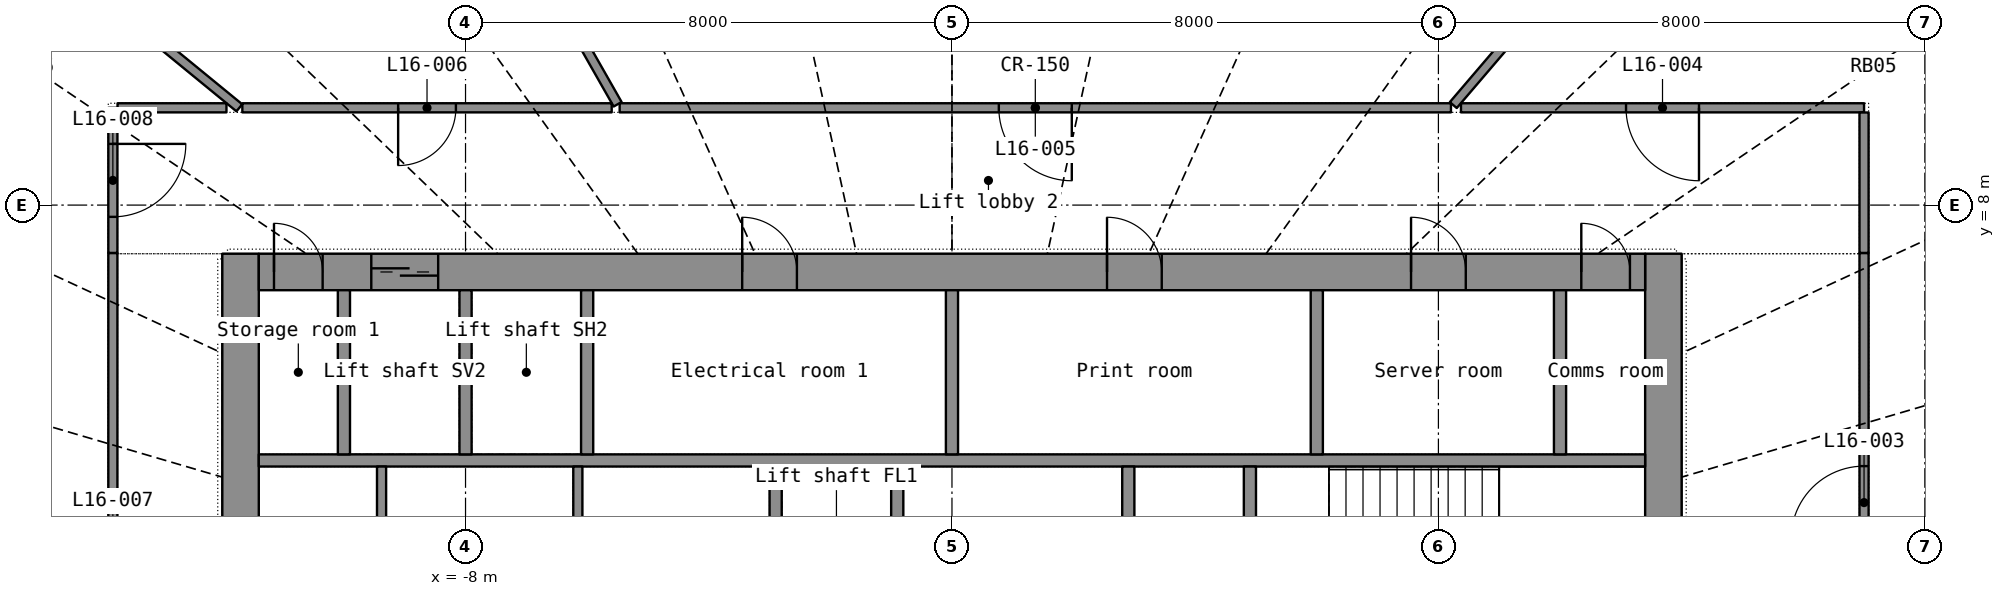
"""IFC4 building model, lengths in metres.
Left out: names, types, materials, properties, quantities, classifications, styles, units other than length and angle.
Written with IfcOpenShell. Run it as: python <this file> out.ifc"""

import sys

from ifc_helpers import new_model, si_unit, direction, frame, frame_2d, origin, place, context, subcontext, project, spatial, rectangle, extrude, element, fill, save


model = new_model("IFC4")
c1 = context("Model", 3, precision=1e-05, world=origin(), true_north=direction((0.0, 1.0)))
c2 = subcontext(c1, "Body", "Model", "MODEL_VIEW")
j1 = project(units=[si_unit("LENGTHUNIT", "METRE"), si_unit("PLANEANGLEUNIT", "RADIAN")], contexts=[c1])
p1 = place(None, origin())
s1 = spatial("IfcSite", under=j1, at=p1, CompositionType="ELEMENT")
p2 = place(p1, origin())
s2 = spatial("IfcBuilding", under=s1, at=p2, CompositionType="ELEMENT")
p3 = place(p2, frame((0.0, 0.0, 70.4)))
s3 = spatial("IfcBuildingStorey", under=s2, at=p3, CompositionType="ELEMENT", Elevation=70.4)
p4 = place(p3, frame((-11.7, -7.2, 0.0), z_axis=(0.0, 0.0, 1.0), x_axis=(0.0, 1.0, 0.0)))
e1 = element("IfcWall", 1, at=p4, inside=s3, PredefinedType="SHEAR", context=c2, shape_type="SweptSolid", body=[
    extrude(rectangle(XDim=14.4, YDim=0.6, at=frame_2d((7.2, 0.0))), origin(), (0.0, 0.0, 1.0), 3.3),
])
p5 = place(p4, frame((6.5, 0.0, 0.0)))
e2 = element("IfcOpeningElement", 2, at=p5, cuts=e1, PredefinedType="OPENING", context=c2, shape_type="SweptSolid", body=[
    extrude(rectangle(XDim=1.4, YDim=2.2, at=frame_2d((0.7, 1.1))), frame((0.0, 0.31, 0.0), z_axis=(0.0, -1.0, 0.0), x_axis=(1.0, 0.0, 0.0)), (0.0, 0.0, 1.0), 0.62),
])
p6 = place(p3, frame((11.7, -7.2, 0.0), z_axis=(0.0, 0.0, 1.0), x_axis=(0.0, 1.0, 0.0)))
e3 = element("IfcWall", 3, at=p6, inside=s3, PredefinedType="SHEAR", context=c2, shape_type="SweptSolid", body=[
    extrude(rectangle(XDim=14.4, YDim=0.6, at=frame_2d((7.2, 0.0))), origin(), (0.0, 0.0, 1.0), 3.3),
])
p7 = place(p6, frame((6.5, 0.0, 0.0)))
e4 = element("IfcOpeningElement", 4, at=p7, cuts=e3, PredefinedType="OPENING", context=c2, shape_type="SweptSolid", body=[
    extrude(rectangle(XDim=1.4, YDim=2.2, at=frame_2d((0.7, 1.1))), frame((0.0, 0.31, 0.0), z_axis=(0.0, -1.0, 0.0), x_axis=(1.0, 0.0, 0.0)), (0.0, 0.0, 1.0), 0.62),
])
p8 = place(p3, frame((-11.4, 6.9, 0.0), z_axis=(0.0, 0.0, 1.0), x_axis=(1.0, 0.0, 0.0)))
e5 = element("IfcWall", 5, at=p8, inside=s3, PredefinedType="SHEAR", context=c2, shape_type="SweptSolid", body=[
    extrude(rectangle(XDim=22.8, YDim=0.6, at=frame_2d((11.4, 0.0))), origin(), (0.0, 0.0, 1.0), 3.3),
])
p9 = place(p8, frame((1.85, 0.0, 0.0)))
e6 = element("IfcOpeningElement", 6, at=p9, cuts=e5, PredefinedType="OPENING", context=c2, shape_type="SweptSolid", body=[
    extrude(rectangle(XDim=1.1, YDim=2.2, at=frame_2d((0.55, 1.1))), frame((0.0, 0.31, 0.0), z_axis=(0.0, -1.0, 0.0), x_axis=(1.0, 0.0, 0.0)), (0.0, 0.0, 1.0), 0.62),
])
p10 = place(p8, frame((7.95, 0.0, 0.0)))
e7 = element("IfcOpeningElement", 7, at=p10, cuts=e5, PredefinedType="OPENING", context=c2, shape_type="SweptSolid", body=[
    extrude(rectangle(XDim=0.9, YDim=2.1, at=frame_2d((0.45, 1.05))), frame((0.0, 0.31, 0.0), z_axis=(0.0, -1.0, 0.0), x_axis=(1.0, 0.0, 0.0)), (0.0, 0.0, 1.0), 0.62),
])
p11 = place(p8, frame((13.95, 0.0, 0.0)))
e8 = element("IfcOpeningElement", 8, at=p11, cuts=e5, PredefinedType="OPENING", context=c2, shape_type="SweptSolid", body=[
    extrude(rectangle(XDim=0.9, YDim=2.1, at=frame_2d((0.45, 1.05))), frame((0.0, 0.31, 0.0), z_axis=(0.0, -1.0, 0.0), x_axis=(1.0, 0.0, 0.0)), (0.0, 0.0, 1.0), 0.62),
])
p12 = place(p8, frame((18.95, 0.0, 0.0)))
e9 = element("IfcOpeningElement", 9, at=p12, cuts=e5, PredefinedType="OPENING", context=c2, shape_type="SweptSolid", body=[
    extrude(rectangle(XDim=0.9, YDim=2.1, at=frame_2d((0.45, 1.05))), frame((0.0, 0.31, 0.0), z_axis=(0.0, -1.0, 0.0), x_axis=(1.0, 0.0, 0.0)), (0.0, 0.0, 1.0), 0.62),
])
p13 = place(p8, frame((0.25, 0.0, 0.0)))
e10 = element("IfcOpeningElement", 10, at=p13, cuts=e5, PredefinedType="OPENING", context=c2, shape_type="SweptSolid", body=[
    extrude(rectangle(XDim=0.8, YDim=2.05, at=frame_2d((0.4, 1.025))), frame((0.0, 0.31, 0.0), z_axis=(0.0, -1.0, 0.0), x_axis=(1.0, 0.0, 0.0)), (0.0, 0.0, 1.0), 0.62),
])
p14 = place(p8, frame((21.75, 0.0, 0.0)))
e11 = element("IfcOpeningElement", 11, at=p14, cuts=e5, PredefinedType="OPENING", context=c2, shape_type="SweptSolid", body=[
    extrude(rectangle(XDim=0.8, YDim=2.05, at=frame_2d((0.4, 1.025))), frame((0.0, 0.31, 0.0), z_axis=(0.0, -1.0, 0.0), x_axis=(1.0, 0.0, 0.0)), (0.0, 0.0, 1.0), 0.62),
])
p15 = place(p3, frame((-11.4, 3.8, 0.0), z_axis=(0.0, 0.0, 1.0), x_axis=(1.0, 0.0, 0.0)))
e12 = element("IfcWall", 12, at=p15, inside=s3, PredefinedType="SHEAR", context=c2, shape_type="SweptSolid", body=[
    extrude(rectangle(XDim=22.8, YDim=0.2, at=frame_2d((11.4, 0.0))), origin(), (0.0, 0.0, 1.0), 3.3),
])
for number, where, z_axis, x_axis in (
    (13, (-10.0, 3.9, 0.0), (0.0, 0.0, 1.0), (0.0, 1.0, 0.0)),
    (14, (-8.0, 3.9, 0.0), (0.0, 0.0, 1.0), (0.0, 1.0, 0.0)),
    (15, (-6.0, 3.9, 0.0), (0.0, 0.0, 1.0), (0.0, 1.0, 0.0)),
    (16, (10.0, 3.9, 0.0), (0.0, 0.0, 1.0), (0.0, 1.0, 0.0)),
):
    element("IfcWall", number, at=place(p3, frame(where, z_axis=z_axis, x_axis=x_axis)), inside=s3, PredefinedType="SHEAR", context=c2, shape_type="SweptSolid", body=[
        extrude(rectangle(XDim=2.7, YDim=0.2, at=frame_2d((1.35, 0.0))), origin(), (0.0, 0.0, 1.0), 3.3),
    ])
for number, where, z_axis, x_axis in (
    (17, (0.0, 3.9, 0.0), (0.0, 0.0, 1.0), (0.0, 1.0, 0.0)),
    (18, (6.0, 3.9, 0.0), (0.0, 0.0, 1.0), (0.0, 1.0, 0.0)),
):
    element("IfcWall", number, at=place(p3, frame(where, z_axis=z_axis, x_axis=x_axis)), inside=s3, PredefinedType="PARTITIONING", context=c2, shape_type="SweptSolid", body=[
        extrude(rectangle(XDim=2.7, YDim=0.2, at=frame_2d((1.35, 0.0))), origin(), (0.0, 0.0, 1.0), 3.3),
    ])
p16 = place(p3, frame((-2.9, -3.7, 0.0), z_axis=(0.0, 0.0, 1.0), x_axis=(0.0, 1.0, 0.0)))
e19 = element("IfcWall", 19, at=p16, inside=s3, PredefinedType="SHEAR", context=c2, shape_type="SweptSolid", body=[
    extrude(rectangle(XDim=7.4, YDim=0.2, at=frame_2d((3.7, 0.0))), origin(), (0.0, 0.0, 1.0), 3.3),
])
p17 = place(p16, frame((3.1, 0.0, 0.0)))
e20 = element("IfcOpeningElement", 20, at=p17, cuts=e19, PredefinedType="OPENING", context=c2, shape_type="SweptSolid", body=[
    extrude(rectangle(XDim=1.2, YDim=2.2, at=frame_2d((0.6, 1.1))), frame((0.0, 0.11, 0.0), z_axis=(0.0, -1.0, 0.0), x_axis=(1.0, 0.0, 0.0)), (0.0, 0.0, 1.0), 0.22),
])
p18 = place(p3, frame((2.9, -3.7, 0.0), z_axis=(0.0, 0.0, 1.0), x_axis=(0.0, 1.0, 0.0)))
e21 = element("IfcWall", 21, at=p18, inside=s3, PredefinedType="SHEAR", context=c2, shape_type="SweptSolid", body=[
    extrude(rectangle(XDim=7.4, YDim=0.2, at=frame_2d((3.7, 0.0))), origin(), (0.0, 0.0, 1.0), 3.3),
])
p19 = place(p18, frame((3.1, 0.0, 0.0)))
e22 = element("IfcOpeningElement", 22, at=p19, cuts=e21, PredefinedType="OPENING", context=c2, shape_type="SweptSolid", body=[
    extrude(rectangle(XDim=1.2, YDim=2.2, at=frame_2d((0.6, 1.1))), frame((0.0, 0.11, 0.0), z_axis=(0.0, -1.0, 0.0), x_axis=(1.0, 0.0, 0.0)), (0.0, 0.0, 1.0), 0.22),
])
for number, where, z_axis, x_axis in (
    (23, (-0.9, 1.35, 0.0), (0.0, 0.0, 1.0), (0.0, 1.0, 0.0)),
    (24, (4.9, 1.35, 0.0), (0.0, 0.0, 1.0), (0.0, 1.0, 0.0)),
):
    element("IfcWall", number, at=place(p3, frame(where, z_axis=z_axis, x_axis=x_axis)), inside=s3, PredefinedType="SHEAR", context=c2, shape_type="SweptSolid", body=[
        extrude(rectangle(XDim=2.35, YDim=0.2, at=frame_2d((1.175, 0.0))), origin(), (0.0, 0.0, 1.0), 3.3),
    ])
for number, where, z_axis, x_axis in (
    (25, (-9.381, 1.35, 0.0), (0.0, 0.0, 1.0), (0.0, 1.0, 0.0)),
    (26, (-6.153, 1.35, 0.0), (0.0, 0.0, 1.0), (0.0, 1.0, 0.0)),
):
    element("IfcWall", number, at=place(p3, frame(where, z_axis=z_axis, x_axis=x_axis)), inside=s3, PredefinedType="PARTITIONING", context=c2, shape_type="SweptSolid", body=[
        extrude(rectangle(XDim=2.35, YDim=0.15, at=frame_2d((1.175, 0.0))), origin(), (0.0, 0.0, 1.0), 3.3),
    ])
p20 = place(p3, frame((8.206, 9.6, 0.0), z_axis=(0.0, 0.0, 1.0), x_axis=(-1.0, 0.0, 0.0)))
e27 = element("IfcWall", 27, at=p20, inside=s3, PredefinedType="PARTITIONING", context=c2, shape_type="SweptSolid", body=[
    extrude(rectangle(XDim=13.671, YDim=0.15, at=frame_2d((6.836, 0.0))), origin(), (0.0, 0.0, 1.0), 2.4),
])
p21 = place(p20, frame((6.236, 0.0, 0.0)))
e28 = element("IfcOpeningElement", 28, at=p21, cuts=e27, PredefinedType="OPENING", context=c2, shape_type="SweptSolid", body=[
    extrude(rectangle(XDim=1.2, YDim=2.2, at=frame_2d((0.6, 1.1))), frame((0.0, 0.085, 0.0), z_axis=(0.0, -1.0, 0.0), x_axis=(1.0, 0.0, 0.0)), (0.0, 0.0, 1.0), 0.17),
])
p22 = place(p3, frame((-11.314, 19.874, 0.0), z_axis=(0.0, 0.0, 1.0), x_axis=(0.49473362, -0.869044674, 0.0)))
e29 = element("IfcWall", 29, at=p22, inside=s3, PredefinedType="PARTITIONING", context=c2, shape_type="SweptSolid", body=[
    extrude(rectangle(XDim=11.755, YDim=0.15, at=frame_2d((5.877, 0.0))), origin(), (0.0, 0.0, 1.0), 2.4),
])
p23 = place(p3, frame((15.357, 17.965, 0.0), z_axis=(0.0, 0.0, 1.0), x_axis=(-0.649780526, -0.760121877, 0.0)))
e30 = element("IfcWall", 30, at=p23, inside=s3, PredefinedType="PARTITIONING", context=c2, shape_type="SweptSolid", body=[
    extrude(rectangle(XDim=10.946, YDim=0.15, at=frame_2d((5.473, 0.0))), origin(), (0.0, 0.0, 1.0), 2.4),
])
p24 = place(p3, frame((-13.8, 7.212, 0.0), z_axis=(0.0, 0.0, 1.0), x_axis=(0.0, -1.0, 0.0)))
e31 = element("IfcWall", 31, at=p24, inside=s3, PredefinedType="PARTITIONING", context=c2, shape_type="SweptSolid", body=[
    extrude(rectangle(XDim=10.166, YDim=0.15, at=frame_2d((5.083, 0.0))), origin(), (0.0, 0.0, 1.0), 2.4),
])
p25 = place(p24, frame((4.483, 0.0, 0.0)))
e32 = element("IfcOpeningElement", 32, at=p25, cuts=e31, PredefinedType="OPENING", context=c2, shape_type="SweptSolid", body=[
    extrude(rectangle(XDim=1.2, YDim=2.2, at=frame_2d((0.6, 1.1))), frame((0.0, 0.085, 0.0), z_axis=(0.0, -1.0, 0.0), x_axis=(1.0, 0.0, 0.0)), (0.0, 0.0, 1.0), 0.17),
])
p26 = place(p3, frame((-18.937, 15.511, 0.0), z_axis=(0.0, 0.0, 1.0), x_axis=(0.773614383, -0.633656678, 0.0)))
e33 = element("IfcWall", 33, at=p26, inside=s3, PredefinedType="PARTITIONING", context=c2, shape_type="SweptSolid", body=[
    extrude(rectangle(XDim=9.329, YDim=0.15, at=frame_2d((4.665, 0.0))), origin(), (0.0, 0.0, 1.0), 2.4),
])
p27 = place(p3, frame((15.0, -0.998, 0.0), z_axis=(0.0, 0.0, 1.0), x_axis=(0.0, 1.0, 0.0)))
e34 = element("IfcWall", 34, at=p27, inside=s3, PredefinedType="PARTITIONING", context=c2, shape_type="SweptSolid", body=[
    extrude(rectangle(XDim=8.21, YDim=0.15, at=frame_2d((4.105, 0.0))), origin(), (0.0, 0.0, 1.0), 2.4),
])
p28 = place(p27, frame((3.505, 0.0, 0.0)))
e35 = element("IfcOpeningElement", 35, at=p28, cuts=e34, PredefinedType="OPENING", context=c2, shape_type="SweptSolid", body=[
    extrude(rectangle(XDim=1.2, YDim=2.2, at=frame_2d((0.6, 1.1))), frame((0.0, 0.085, 0.0), z_axis=(0.0, -1.0, 0.0), x_axis=(1.0, 0.0, 0.0)), (0.0, 0.0, 1.0), 0.17),
])
p29 = place(p3, frame((15.0, 9.6, 0.0), z_axis=(0.0, 0.0, 1.0), x_axis=(-1.0, 0.0, 0.0)))
e36 = element("IfcWall", 36, at=p29, inside=s3, PredefinedType="PARTITIONING", context=c2, shape_type="SweptSolid", body=[
    extrude(rectangle(XDim=6.629, YDim=0.15, at=frame_2d((3.314, 0.0))), origin(), (0.0, 0.0, 1.0), 2.4),
])
p30 = place(p29, frame((2.714, 0.0, 0.0)))
e37 = element("IfcOpeningElement", 37, at=p30, cuts=e36, PredefinedType="OPENING", context=c2, shape_type="SweptSolid", body=[
    extrude(rectangle(XDim=1.2, YDim=2.2, at=frame_2d((0.6, 1.1))), frame((0.0, 0.085, 0.0), z_axis=(0.0, -1.0, 0.0), x_axis=(1.0, 0.0, 0.0)), (0.0, 0.0, 1.0), 0.17),
])
p31 = place(p3, frame((-5.596, 9.6, 0.0), z_axis=(0.0, 0.0, 1.0), x_axis=(-1.0, 0.0, 0.0)))
e38 = element("IfcWall", 38, at=p31, inside=s3, PredefinedType="PARTITIONING", context=c2, shape_type="SweptSolid", body=[
    extrude(rectangle(XDim=6.074, YDim=0.15, at=frame_2d((3.037, 0.0))), origin(), (0.0, 0.0, 1.0), 2.4),
])
p32 = place(p31, frame((2.562, 0.0, 0.0)))
e39 = element("IfcOpeningElement", 39, at=p32, cuts=e38, PredefinedType="OPENING", context=c2, shape_type="SweptSolid", body=[
    extrude(rectangle(XDim=0.95, YDim=2.15, at=frame_2d((0.475, 1.075))), frame((0.0, 0.085, 0.0), z_axis=(0.0, -1.0, 0.0), x_axis=(1.0, 0.0, 0.0)), (0.0, 0.0, 1.0), 0.17),
])
p33 = place(p3, frame((-13.8, 9.6, 0.0), z_axis=(0.0, 0.0, 1.0), x_axis=(0.0, -1.0, 0.0)))
e40 = element("IfcWall", 40, at=p33, inside=s3, PredefinedType="PARTITIONING", context=c2, shape_type="SweptSolid", body=[
    extrude(rectangle(XDim=2.387, YDim=0.15, at=frame_2d((1.194, 0.0))), origin(), (0.0, 0.0, 1.0), 2.4),
])
p34 = place(p33, frame((0.594, 0.0, 0.0)))
e41 = element("IfcOpeningElement", 41, at=p34, cuts=e40, PredefinedType="OPENING", context=c2, shape_type="SweptSolid", body=[
    extrude(rectangle(XDim=1.2, YDim=2.2, at=frame_2d((0.6, 1.1))), frame((0.0, 0.085, 0.0), z_axis=(0.0, -1.0, 0.0), x_axis=(1.0, 0.0, 0.0)), (0.0, 0.0, 1.0), 0.17),
])
p35 = place(p3, frame((15.0, 7.213, 0.0), z_axis=(0.0, 0.0, 1.0), x_axis=(0.0, 1.0, 0.0)))
e42 = element("IfcWall", 42, at=p35, inside=s3, PredefinedType="PARTITIONING", context=c2, shape_type="SweptSolid", body=[
    extrude(rectangle(XDim=2.31, YDim=0.15, at=frame_2d((1.155, 0.0))), origin(), (0.0, 0.0, 1.0), 2.4),
])
p36 = place(p3, frame((-11.932, 9.6, 0.0), z_axis=(0.0, 0.0, 1.0), x_axis=(-1.0, 0.0, 0.0)))
e43 = element("IfcWall", 43, at=p36, inside=s3, PredefinedType="PARTITIONING", context=c2, shape_type="SweptSolid", body=[
    extrude(rectangle(XDim=1.791, YDim=0.15, at=frame_2d((0.896, 0.0))), origin(), (0.0, 0.0, 1.0), 2.4),
])
p37 = place(p9, origin())
e44 = element("IfcDoor", 44, at=p37, inside=s3, OperationType="DOUBLE_DOOR_SLIDING", PredefinedType="DOOR", context=c2, shape_type="SweptSolid", body=[
    extrude(rectangle(XDim=1.1, YDim=2.2, at=frame_2d((0.55, 1.1))), frame((0.0, 0.025, 0.0), z_axis=(0.0, -1.0, 0.0), x_axis=(1.0, 0.0, 0.0)), (0.0, 0.0, 1.0), 0.05),
])
fill(e6, e44)
p38 = place(p10, origin())
e45 = element("IfcDoor", 45, at=p38, inside=s3, OperationType="SINGLE_SWING_LEFT", PredefinedType="DOOR", context=c2, shape_type="SweptSolid", body=[
    extrude(rectangle(XDim=0.9, YDim=2.1, at=frame_2d((0.45, 1.05))), frame((0.0, 0.025, 0.0), z_axis=(0.0, -1.0, 0.0), x_axis=(1.0, 0.0, 0.0)), (0.0, 0.0, 1.0), 0.05),
])
fill(e7, e45)
p39 = place(p11, origin())
e46 = element("IfcDoor", 46, at=p39, inside=s3, OperationType="SINGLE_SWING_LEFT", PredefinedType="DOOR", context=c2, shape_type="SweptSolid", body=[
    extrude(rectangle(XDim=0.9, YDim=2.1, at=frame_2d((0.45, 1.05))), frame((0.0, 0.025, 0.0), z_axis=(0.0, -1.0, 0.0), x_axis=(1.0, 0.0, 0.0)), (0.0, 0.0, 1.0), 0.05),
])
fill(e8, e46)
p40 = place(p12, origin())
e47 = element("IfcDoor", 47, at=p40, inside=s3, OperationType="SINGLE_SWING_LEFT", PredefinedType="DOOR", context=c2, shape_type="SweptSolid", body=[
    extrude(rectangle(XDim=0.9, YDim=2.1, at=frame_2d((0.45, 1.05))), frame((0.0, 0.025, 0.0), z_axis=(0.0, -1.0, 0.0), x_axis=(1.0, 0.0, 0.0)), (0.0, 0.0, 1.0), 0.05),
])
fill(e9, e47)
p41 = place(p13, origin())
e48 = element("IfcDoor", 48, at=p41, inside=s3, OperationType="SINGLE_SWING_LEFT", PredefinedType="DOOR", context=c2, shape_type="SweptSolid", body=[
    extrude(rectangle(XDim=0.8, YDim=2.05, at=frame_2d((0.4, 1.025))), frame((0.0, 0.025, 0.0), z_axis=(0.0, -1.0, 0.0), x_axis=(1.0, 0.0, 0.0)), (0.0, 0.0, 1.0), 0.05),
])
fill(e10, e48)
p42 = place(p14, origin())
e49 = element("IfcDoor", 49, at=p42, inside=s3, OperationType="SINGLE_SWING_LEFT", PredefinedType="DOOR", context=c2, shape_type="SweptSolid", body=[
    extrude(rectangle(XDim=0.8, YDim=2.05, at=frame_2d((0.4, 1.025))), frame((0.0, 0.025, 0.0), z_axis=(0.0, -1.0, 0.0), x_axis=(1.0, 0.0, 0.0)), (0.0, 0.0, 1.0), 0.05),
])
fill(e11, e49)
p43 = place(p28, origin())
e50 = element("IfcDoor", 50, at=p43, inside=s3, OperationType="DOUBLE_DOOR_SINGLE_SWING", PredefinedType="DOOR", context=c2, shape_type="SweptSolid", body=[
    extrude(rectangle(XDim=1.2, YDim=2.2, at=frame_2d((0.6, 1.1))), frame((0.0, 0.025, 0.0), z_axis=(0.0, -1.0, 0.0), x_axis=(1.0, 0.0, 0.0)), (0.0, 0.0, 1.0), 0.05),
])
fill(e35, e50)
p44 = place(p30, origin())
e51 = element("IfcDoor", 51, at=p44, inside=s3, OperationType="DOUBLE_DOOR_SINGLE_SWING", PredefinedType="DOOR", context=c2, shape_type="SweptSolid", body=[
    extrude(rectangle(XDim=1.2, YDim=2.2, at=frame_2d((0.6, 1.1))), frame((0.0, 0.025, 0.0), z_axis=(0.0, -1.0, 0.0), x_axis=(1.0, 0.0, 0.0)), (0.0, 0.0, 1.0), 0.05),
])
fill(e37, e51)
p45 = place(p21, origin())
e52 = element("IfcDoor", 52, at=p45, inside=s3, OperationType="DOUBLE_DOOR_SINGLE_SWING", PredefinedType="DOOR", context=c2, shape_type="SweptSolid", body=[
    extrude(rectangle(XDim=1.2, YDim=2.2, at=frame_2d((0.6, 1.1))), frame((0.0, 0.025, 0.0), z_axis=(0.0, -1.0, 0.0), x_axis=(1.0, 0.0, 0.0)), (0.0, 0.0, 1.0), 0.05),
])
fill(e28, e52)
p46 = place(p32, origin())
e53 = element("IfcDoor", 53, at=p46, inside=s3, OperationType="SINGLE_SWING_RIGHT", PredefinedType="DOOR", context=c2, shape_type="SweptSolid", body=[
    extrude(rectangle(XDim=0.95, YDim=2.15, at=frame_2d((0.475, 1.075))), frame((0.0, 0.025, 0.0), z_axis=(0.0, -1.0, 0.0), x_axis=(1.0, 0.0, 0.0)), (0.0, 0.0, 1.0), 0.05),
])
fill(e39, e53)
p47 = place(p34, origin())
e54 = element("IfcDoor", 54, at=p47, inside=s3, OperationType="DOUBLE_DOOR_SINGLE_SWING", PredefinedType="DOOR", context=c2, shape_type="SweptSolid", body=[
    extrude(rectangle(XDim=1.2, YDim=2.2, at=frame_2d((0.6, 1.1))), frame((0.0, 0.025, 0.0), z_axis=(0.0, -1.0, 0.0), x_axis=(1.0, 0.0, 0.0)), (0.0, 0.0, 1.0), 0.05),
])
fill(e41, e54)
save(model, sys.argv[1])
